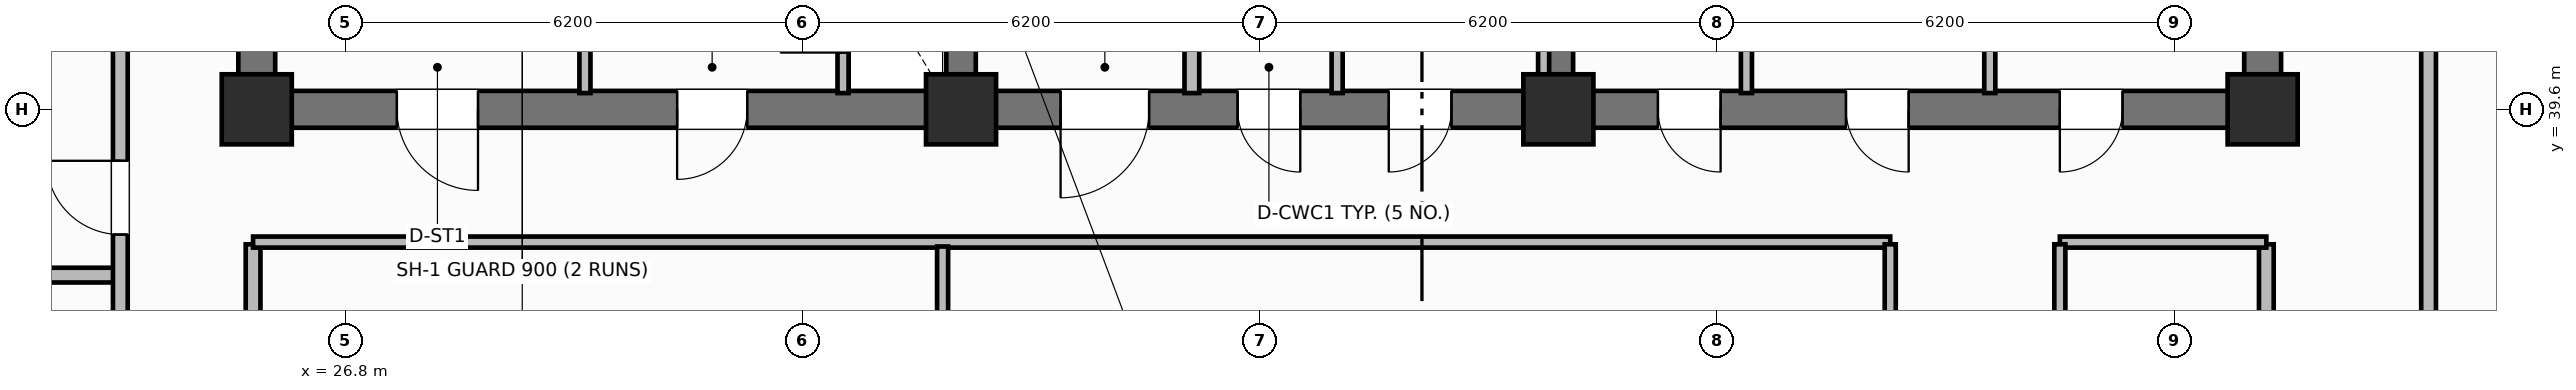
"""IFC4 building model, lengths in metres.
Left out: names, types, materials, properties, quantities, classifications, styles, units other than length and angle.
Written with IfcOpenShell. Run it as: python <this file> out.ifc"""

import sys

from ifc_helpers import new_model, si_unit, direction, frame, frame_2d, origin, origin_2d, place, context, subcontext, project, spatial, rectangle, extrude, element, fill, save


model = new_model("IFC4")
c1 = context("Model", 3, precision=1e-05, world=origin(), true_north=direction((0.0, 1.0)))
c2 = subcontext(c1, "Body", "Model", "MODEL_VIEW")
j1 = project(units=[si_unit("LENGTHUNIT", "METRE"), si_unit("PLANEANGLEUNIT", "RADIAN")], contexts=[c1])
p1 = place(None, origin())
s1 = spatial("IfcSite", under=j1, at=p1, CompositionType="ELEMENT")
p2 = place(p1, origin())
s2 = spatial("IfcBuilding", under=s1, at=p2, CompositionType="ELEMENT")
p3 = place(p2, frame((0.0, 0.0, 173.7)))
s3 = spatial("IfcBuildingStorey", under=s2, at=p3, CompositionType="ELEMENT", Elevation=173.7)
for number, where, z_axis, x_axis in (
    (1, (25.6, 39.85, 0.0), (0.0, 0.0, 1.0), (0.0, 1.0, 0.0)),
    (2, (52.8, 39.85, 0.0), (0.0, 0.0, 1.0), (0.0, 1.0, 0.0)),
):
    element("IfcWall", number, at=place(p3, frame(where, z_axis=z_axis, x_axis=x_axis)), inside=s3, PredefinedType="SHEAR", context=c2, shape_type="SweptSolid", body=[
        extrude(rectangle(XDim=5.7, YDim=0.5, at=frame_2d((2.85, 0.0))), origin(), (0.0, 0.0, 1.0), 3.7),
    ])
p4 = place(p3, frame((52.8, 39.6, 0.0), z_axis=(0.0, 0.0, 1.0), x_axis=(-1.0, 0.0, 0.0)))
e3 = element("IfcWall", 3, at=p4, inside=s3, PredefinedType="SHEAR", context=c2, shape_type="SweptSolid", body=[
    extrude(rectangle(XDim=27.2, YDim=0.5, at=frame_2d((13.6, 0.0))), origin(), (0.0, 0.0, 1.0), 3.7),
])
p5 = place(p4, frame((24.2, 0.0, 0.0)))
e4 = element("IfcOpeningElement", 4, at=p5, cuts=e3, PredefinedType="OPENING", context=c2, shape_type="SweptSolid", body=[
    extrude(rectangle(XDim=1.1, YDim=2.15, at=frame_2d((0.55, 1.075))), frame((0.0, 0.26, 0.0), z_axis=(0.0, -1.0, 0.0), x_axis=(1.0, 0.0, 0.0)), (0.0, 0.0, 1.0), 0.52),
])
p6 = place(p4, frame((20.55, 0.0, 0.0)))
e5 = element("IfcOpeningElement", 5, at=p6, cuts=e3, PredefinedType="OPENING", context=c2, shape_type="SweptSolid", body=[
    extrude(rectangle(XDim=0.95, YDim=2.1, at=frame_2d((0.475, 1.05))), frame((0.0, 0.26, 0.0), z_axis=(0.0, -1.0, 0.0), x_axis=(1.0, 0.0, 0.0)), (0.0, 0.0, 1.0), 0.52),
])
p7 = place(p4, frame((15.1, 0.0, 0.0)))
e6 = element("IfcOpeningElement", 6, at=p7, cuts=e3, PredefinedType="OPENING", context=c2, shape_type="SweptSolid", body=[
    extrude(rectangle(XDim=1.2, YDim=2.15, at=frame_2d((0.6, 1.075))), frame((0.0, 0.26, 0.0), z_axis=(0.0, -1.0, 0.0), x_axis=(1.0, 0.0, 0.0)), (0.0, 0.0, 1.0), 0.52),
])
p8 = place(p4, frame((13.05, 0.0, 0.0)))
e7 = element("IfcOpeningElement", 7, at=p8, cuts=e3, PredefinedType="OPENING", context=c2, shape_type="SweptSolid", body=[
    extrude(rectangle(XDim=0.85, YDim=2.1, at=frame_2d((0.425, 1.05))), frame((0.0, 0.26, 0.0), z_axis=(0.0, -1.0, 0.0), x_axis=(1.0, 0.0, 0.0)), (0.0, 0.0, 1.0), 0.52),
])
p9 = place(p4, frame((11.0, 0.0, 0.0)))
e8 = element("IfcOpeningElement", 8, at=p9, cuts=e3, PredefinedType="OPENING", context=c2, shape_type="SweptSolid", body=[
    extrude(rectangle(XDim=0.85, YDim=2.1, at=frame_2d((0.425, 1.05))), frame((0.0, 0.26, 0.0), z_axis=(0.0, -1.0, 0.0), x_axis=(1.0, 0.0, 0.0)), (0.0, 0.0, 1.0), 0.52),
])
p10 = place(p4, frame((7.35, 0.0, 0.0)))
e9 = element("IfcOpeningElement", 9, at=p10, cuts=e3, PredefinedType="OPENING", context=c2, shape_type="SweptSolid", body=[
    extrude(rectangle(XDim=0.85, YDim=2.1, at=frame_2d((0.425, 1.05))), frame((0.0, 0.26, 0.0), z_axis=(0.0, -1.0, 0.0), x_axis=(1.0, 0.0, 0.0)), (0.0, 0.0, 1.0), 0.52),
])
p11 = place(p4, frame((4.8, 0.0, 0.0)))
e10 = element("IfcOpeningElement", 10, at=p11, cuts=e3, PredefinedType="OPENING", context=c2, shape_type="SweptSolid", body=[
    extrude(rectangle(XDim=0.85, YDim=2.1, at=frame_2d((0.425, 1.05))), frame((0.0, 0.26, 0.0), z_axis=(0.0, -1.0, 0.0), x_axis=(1.0, 0.0, 0.0)), (0.0, 0.0, 1.0), 0.52),
])
p12 = place(p4, frame((1.9, 0.0, 0.0)))
e11 = element("IfcOpeningElement", 11, at=p12, cuts=e3, PredefinedType="OPENING", context=c2, shape_type="SweptSolid", body=[
    extrude(rectangle(XDim=0.85, YDim=2.1, at=frame_2d((0.425, 1.05))), frame((0.0, 0.26, 0.0), z_axis=(0.0, -1.0, 0.0), x_axis=(1.0, 0.0, 0.0)), (0.0, 0.0, 1.0), 0.52),
])
for number, where, z_axis, x_axis in (
    (12, (35.15, 39.85, 0.0), (0.0, 0.0, 1.0), (0.0, 1.0, 0.0)),
    (13, (43.25, 39.85, 0.0), (0.0, 0.0, 1.0), (0.0, 1.0, 0.0)),
):
    element("IfcWall", number, at=place(p3, frame(where, z_axis=z_axis, x_axis=x_axis)), inside=s3, PredefinedType="SHEAR", context=c2, shape_type="SweptSolid", body=[
        extrude(rectangle(XDim=5.7, YDim=0.4, at=frame_2d((2.85, 0.0))), origin(), (0.0, 0.0, 1.0), 3.7),
    ])
for number, where, z_axis, x_axis in (
    (14, (25.6, 39.6, 0.0), (0.0, 0.0, 1.0), (1.0, 0.0, 0.0)),
    (15, (35.15, 39.6, 0.0), (0.0, 0.0, 1.0), (1.0, 0.0, 0.0)),
    (16, (43.25, 39.6, 0.0), (0.0, 0.0, 1.0), (1.0, 0.0, 0.0)),
    (17, (52.8, 39.6, 0.0), (0.0, 0.0, 1.0), (1.0, 0.0, 0.0)),
):
    element("IfcColumn", number, at=place(p3, frame(where, z_axis=z_axis, x_axis=x_axis)), inside=s3, PredefinedType="COLUMN", context=c2, shape_type="SweptSolid", body=[
        extrude(rectangle(XDim=0.95, YDim=0.95, at=origin_2d()), origin(), (0.0, 0.0, 1.0), 3.7),
    ])
p13 = place(p3, frame((33.55, 39.82, 0.0), z_axis=(0.0, 0.0, 1.0), x_axis=(0.0, 1.0, 0.0)))
e18 = element("IfcWall", 18, at=p13, inside=s3, PredefinedType="PARTITIONING", context=c2, shape_type="SweptSolid", body=[
    extrude(rectangle(XDim=2.13, YDim=0.15, at=frame_2d((1.065, 0.0))), origin(), (0.0, 0.0, 1.0), 2.55),
])
p14 = place(p13, frame((0.55, 0.0, 0.0)))
e19 = element("IfcOpeningElement", 19, at=p14, cuts=e18, PredefinedType="OPENING", context=c2, shape_type="SweptSolid", body=[
    extrude(rectangle(XDim=0.85, YDim=2.05, at=frame_2d((0.425, 1.025))), frame((0.0, 0.085, 0.0), z_axis=(0.0, -1.0, 0.0), x_axis=(1.0, 0.0, 0.0)), (0.0, 0.0, 1.0), 0.17),
])
p15 = place(p3, frame((30.05, 39.82, 0.0), z_axis=(0.0, 0.0, 1.0), x_axis=(0.0, 1.0, 0.0)))
e20 = element("IfcWall", 20, at=p15, inside=s3, PredefinedType="PARTITIONING", context=c2, shape_type="SweptSolid", body=[
    extrude(rectangle(XDim=2.13, YDim=0.15, at=frame_2d((1.065, 0.0))), origin(), (0.0, 0.0, 1.0), 2.55),
])
p16 = place(p3, frame((38.28, 39.82, 0.0), z_axis=(0.0, 0.0, 1.0), x_axis=(0.0, 1.0, 0.0)))
e21 = element("IfcWall", 21, at=p16, inside=s3, PredefinedType="PARTITIONING", context=c2, shape_type="SweptSolid", body=[
    extrude(rectangle(XDim=5.63, YDim=0.2, at=frame_2d((2.815, 0.0))), origin(), (0.0, 0.0, 1.0), 2.55),
])
for number, where, z_axis, x_axis in (
    (22, (43.05, 39.82, 0.0), (0.0, 0.0, 1.0), (0.0, 1.0, 0.0)),
    (23, (40.25, 39.82, 0.0), (0.0, 0.0, 1.0), (0.0, 1.0, 0.0)),
    (24, (45.8, 39.82, 0.0), (0.0, 0.0, 1.0), (0.0, 1.0, 0.0)),
):
    element("IfcWall", number, at=place(p3, frame(where, z_axis=z_axis, x_axis=x_axis)), inside=s3, PredefinedType="PARTITIONING", context=c2, shape_type="SweptSolid", body=[
        extrude(rectangle(XDim=5.63, YDim=0.15, at=frame_2d((2.815, 0.0))), origin(), (0.0, 0.0, 1.0), 2.55),
    ])
p17 = place(p3, frame((49.1, 39.82, 0.0), z_axis=(0.0, 0.0, 1.0), x_axis=(0.0, 1.0, 0.0)))
e25 = element("IfcWall", 25, at=p17, inside=s3, PredefinedType="PARTITIONING", context=c2, shape_type="SweptSolid", body=[
    extrude(rectangle(XDim=2.73, YDim=0.15, at=frame_2d((1.365, 0.0))), origin(), (0.0, 0.0, 1.0), 2.55),
])
for number, where, z_axis, x_axis in (
    (26, (25.55, 18.63, 0.0), (0.0, 0.0, 1.0), (0.0, 1.0, 0.0)),
    (27, (52.85, 18.63, 0.0), (0.0, 0.0, 1.0), (0.0, 1.0, 0.0)),
):
    element("IfcWall", number, at=place(p3, frame(where, z_axis=z_axis, x_axis=x_axis)), inside=s3, PredefinedType="PARTITIONING", context=c2, shape_type="SweptSolid", body=[
        extrude(rectangle(XDim=19.14, YDim=0.2, at=frame_2d((9.57, 0.0))), origin(), (0.0, 0.0, 1.0), 2.55),
    ])
p18 = place(p3, frame((25.55, 37.8, 0.0), z_axis=(0.0, 0.0, 1.0), x_axis=(1.0, 0.0, 0.0)))
e28 = element("IfcWall", 28, at=p18, inside=s3, PredefinedType="PARTITIONING", context=c2, shape_type="SweptSolid", body=[
    extrude(rectangle(XDim=22.2, YDim=0.15, at=frame_2d((11.1, 0.0))), origin(), (0.0, 0.0, 1.0), 2.55),
])
p19 = place(p3, frame((50.05, 37.8, 0.0), z_axis=(0.0, 0.0, 1.0), x_axis=(1.0, 0.0, 0.0)))
e29 = element("IfcWall", 29, at=p19, inside=s3, PredefinedType="PARTITIONING", context=c2, shape_type="SweptSolid", body=[
    extrude(rectangle(XDim=2.8, YDim=0.15, at=frame_2d((1.4, 0.0))), origin(), (0.0, 0.0, 1.0), 2.55),
])
p20 = place(p3, frame((34.9, 18.66, 0.0), z_axis=(0.0, 0.0, 1.0), x_axis=(0.0, 1.0, 0.0)))
e30 = element("IfcWall", 30, at=p20, inside=s3, PredefinedType="PARTITIONING", context=c2, shape_type="SweptSolid", body=[
    extrude(rectangle(XDim=19.08, YDim=0.15, at=frame_2d((9.54, 0.0))), origin(), (0.0, 0.0, 1.0), 2.55),
])
p21 = place(p20, frame((5.0, 0.0, 0.0)))
e31 = element("IfcOpeningElement", 31, at=p21, cuts=e30, PredefinedType="OPENING", context=c2, shape_type="SweptSolid", body=[
    extrude(rectangle(XDim=1.0, YDim=2.15, at=frame_2d((0.5, 1.075))), frame((0.0, 0.085, 0.0), z_axis=(0.0, -1.0, 0.0), x_axis=(1.0, 0.0, 0.0)), (0.0, 0.0, 1.0), 0.17),
])
p22 = place(p3, frame((47.75, 18.63, 0.0), z_axis=(0.0, 0.0, 1.0), x_axis=(0.0, 1.0, 0.0)))
e32 = element("IfcWall", 32, at=p22, inside=s3, PredefinedType="PARTITIONING", context=c2, shape_type="SweptSolid", body=[
    extrude(rectangle(XDim=19.14, YDim=0.15, at=frame_2d((9.57, 0.0))), origin(), (0.0, 0.0, 1.0), 2.55),
])
p23 = place(p22, frame((2.4, 0.0, 0.0)))
e33 = element("IfcOpeningElement", 33, at=p23, cuts=e32, PredefinedType="OPENING", context=c2, shape_type="SweptSolid", body=[
    extrude(rectangle(XDim=0.9, YDim=2.1, at=frame_2d((0.45, 1.05))), frame((0.0, 0.085, 0.0), z_axis=(0.0, -1.0, 0.0), x_axis=(1.0, 0.0, 0.0)), (0.0, 0.0, 1.0), 0.17),
])
p24 = place(p22, frame((10.804, 0.0, 0.0)))
e34 = element("IfcOpeningElement", 34, at=p24, cuts=e32, PredefinedType="OPENING", context=c2, shape_type="SweptSolid", body=[
    extrude(rectangle(XDim=0.9, YDim=2.1, at=frame_2d((0.45, 1.05))), frame((0.0, 0.085, 0.0), z_axis=(0.0, -1.0, 0.0), x_axis=(1.0, 0.0, 0.0)), (0.0, 0.0, 1.0), 0.17),
])
p25 = place(p3, frame((50.05, 18.63, 0.0), z_axis=(0.0, 0.0, 1.0), x_axis=(0.0, 1.0, 0.0)))
e35 = element("IfcWall", 35, at=p25, inside=s3, PredefinedType="PARTITIONING", context=c2, shape_type="SweptSolid", body=[
    extrude(rectangle(XDim=19.14, YDim=0.15, at=frame_2d((9.57, 0.0))), origin(), (0.0, 0.0, 1.0), 2.55),
])
p26 = place(p25, frame((2.4, 0.0, 0.0)))
e36 = element("IfcOpeningElement", 36, at=p26, cuts=e35, PredefinedType="OPENING", context=c2, shape_type="SweptSolid", body=[
    extrude(rectangle(XDim=1.0, YDim=2.15, at=frame_2d((0.5, 1.075))), frame((0.0, 0.085, 0.0), z_axis=(0.0, -1.0, 0.0), x_axis=(1.0, 0.0, 0.0)), (0.0, 0.0, 1.0), 0.17),
])
p27 = place(p25, frame((10.804, 0.0, 0.0)))
e37 = element("IfcOpeningElement", 37, at=p27, cuts=e35, PredefinedType="OPENING", context=c2, shape_type="SweptSolid", body=[
    extrude(rectangle(XDim=1.0, YDim=2.15, at=frame_2d((0.5, 1.075))), frame((0.0, 0.085, 0.0), z_axis=(0.0, -1.0, 0.0), x_axis=(1.0, 0.0, 0.0)), (0.0, 0.0, 1.0), 0.17),
])
p28 = place(p3, frame((16.57, 37.352, 0.0), z_axis=(0.0, 0.0, 1.0), x_axis=(1.0, 0.0, 0.0)))
e38 = element("IfcWall", 38, at=p28, inside=s3, PredefinedType="PARTITIONING", context=c2, shape_type="SweptSolid", body=[
    extrude(rectangle(XDim=7.18, YDim=0.2, at=frame_2d((3.59, 0.0))), origin(), (0.0, 0.0, 1.0), 2.55),
])
p29 = place(p3, frame((23.75, 10.6, 0.0), z_axis=(0.0, 0.0, 1.0), x_axis=(0.0, 1.0, 0.0)))
e39 = element("IfcWall", 39, at=p29, inside=s3, PredefinedType="PARTITIONING", context=c2, shape_type="SweptSolid", body=[
    extrude(rectangle(XDim=35.2, YDim=0.2, at=frame_2d((17.6, 0.0))), origin(), (0.0, 0.0, 1.0), 2.55),
])
p30 = place(p29, frame((2.65, 0.0, 0.0)))
e40 = element("IfcOpeningElement", 40, at=p30, cuts=e39, PredefinedType="OPENING", context=c2, shape_type="SweptSolid", body=[
    extrude(rectangle(XDim=1.0, YDim=2.15, at=frame_2d((0.5, 1.075))), frame((0.0, 0.11, 0.0), z_axis=(0.0, -1.0, 0.0), x_axis=(1.0, 0.0, 0.0)), (0.0, 0.0, 1.0), 0.22),
])
p31 = place(p29, frame((11.4, 0.0, 0.0)))
e41 = element("IfcOpeningElement", 41, at=p31, cuts=e39, PredefinedType="OPENING", context=c2, shape_type="SweptSolid", body=[
    extrude(rectangle(XDim=1.0, YDim=2.15, at=frame_2d((0.5, 1.075))), frame((0.0, 0.11, 0.0), z_axis=(0.0, -1.0, 0.0), x_axis=(1.0, 0.0, 0.0)), (0.0, 0.0, 1.0), 0.22),
])
p32 = place(p29, frame((21.37, 0.0, 0.0)))
e42 = element("IfcOpeningElement", 42, at=p32, cuts=e39, PredefinedType="OPENING", context=c2, shape_type="SweptSolid", body=[
    extrude(rectangle(XDim=1.0, YDim=2.15, at=frame_2d((0.5, 1.075))), frame((0.0, 0.11, 0.0), z_axis=(0.0, -1.0, 0.0), x_axis=(1.0, 0.0, 0.0)), (0.0, 0.0, 1.0), 0.22),
])
p33 = place(p29, frame((27.302, 0.0, 0.0)))
e43 = element("IfcOpeningElement", 43, at=p33, cuts=e39, PredefinedType="OPENING", context=c2, shape_type="SweptSolid", body=[
    extrude(rectangle(XDim=1.0, YDim=2.15, at=frame_2d((0.5, 1.075))), frame((0.0, 0.11, 0.0), z_axis=(0.0, -1.0, 0.0), x_axis=(1.0, 0.0, 0.0)), (0.0, 0.0, 1.0), 0.22),
])
p34 = place(p3, frame((55.05, 10.6, 0.0), z_axis=(0.0, 0.0, 1.0), x_axis=(0.0, 1.0, 0.0)))
e44 = element("IfcWall", 44, at=p34, inside=s3, PredefinedType="PARTITIONING", context=c2, shape_type="SweptSolid", body=[
    extrude(rectangle(XDim=35.2, YDim=0.2, at=frame_2d((17.6, 0.0))), origin(), (0.0, 0.0, 1.0), 2.55),
])
p35 = place(p34, frame((2.65, 0.0, 0.0)))
e45 = element("IfcOpeningElement", 45, at=p35, cuts=e44, PredefinedType="OPENING", context=c2, shape_type="SweptSolid", body=[
    extrude(rectangle(XDim=1.0, YDim=2.15, at=frame_2d((0.5, 1.075))), frame((0.0, 0.11, 0.0), z_axis=(0.0, -1.0, 0.0), x_axis=(1.0, 0.0, 0.0)), (0.0, 0.0, 1.0), 0.22),
])
p36 = place(p34, frame((19.95, 0.0, 0.0)))
e46 = element("IfcOpeningElement", 46, at=p36, cuts=e44, PredefinedType="OPENING", context=c2, shape_type="SweptSolid", body=[
    extrude(rectangle(XDim=1.0, YDim=2.15, at=frame_2d((0.5, 1.075))), frame((0.0, 0.11, 0.0), z_axis=(0.0, -1.0, 0.0), x_axis=(1.0, 0.0, 0.0)), (0.0, 0.0, 1.0), 0.22),
])
p37 = place(p14, origin())
e47 = element("IfcDoor", 47, at=p37, inside=s3, OperationType="SINGLE_SWING_LEFT", PredefinedType="TRAPDOOR", context=c2, shape_type="SweptSolid", body=[
    extrude(rectangle(XDim=0.85, YDim=2.05, at=frame_2d((0.425, 1.025))), frame((0.0, 0.025, 0.0), z_axis=(0.0, -1.0, 0.0), x_axis=(1.0, 0.0, 0.0)), (0.0, 0.0, 1.0), 0.05),
])
fill(e19, e47)
p38 = place(p33, origin())
e48 = element("IfcDoor", 48, at=p38, inside=s3, OperationType="SINGLE_SWING_RIGHT", PredefinedType="DOOR", context=c2, shape_type="SweptSolid", body=[
    extrude(rectangle(XDim=1.0, YDim=2.15, at=frame_2d((0.5, 1.075))), frame((0.0, 0.025, 0.0), z_axis=(0.0, -1.0, 0.0), x_axis=(1.0, 0.0, 0.0)), (0.0, 0.0, 1.0), 0.05),
])
fill(e43, e48)
p39 = place(p5, origin())
e49 = element("IfcDoor", 49, at=p39, inside=s3, OperationType="SINGLE_SWING_LEFT", PredefinedType="DOOR", context=c2, shape_type="SweptSolid", body=[
    extrude(rectangle(XDim=1.1, YDim=2.15, at=frame_2d((0.55, 1.075))), frame((0.0, 0.025, 0.0), z_axis=(0.0, -1.0, 0.0), x_axis=(1.0, 0.0, 0.0)), (0.0, 0.0, 1.0), 0.05),
])
fill(e4, e49)
p40 = place(p6, origin())
e50 = element("IfcDoor", 50, at=p40, inside=s3, OperationType="SINGLE_SWING_RIGHT", PredefinedType="DOOR", context=c2, shape_type="SweptSolid", body=[
    extrude(rectangle(XDim=0.95, YDim=2.1, at=frame_2d((0.475, 1.05))), frame((0.0, 0.025, 0.0), z_axis=(0.0, -1.0, 0.0), x_axis=(1.0, 0.0, 0.0)), (0.0, 0.0, 1.0), 0.05),
])
fill(e5, e50)
p41 = place(p7, origin())
e51 = element("IfcDoor", 51, at=p41, inside=s3, OperationType="SINGLE_SWING_RIGHT", PredefinedType="DOOR", context=c2, shape_type="SweptSolid", body=[
    extrude(rectangle(XDim=1.2, YDim=2.15, at=frame_2d((0.6, 1.075))), frame((0.0, 0.025, 0.0), z_axis=(0.0, -1.0, 0.0), x_axis=(1.0, 0.0, 0.0)), (0.0, 0.0, 1.0), 0.05),
])
fill(e6, e51)
p42 = place(p8, origin())
e52 = element("IfcDoor", 52, at=p42, inside=s3, OperationType="SINGLE_SWING_LEFT", PredefinedType="DOOR", context=c2, shape_type="SweptSolid", body=[
    extrude(rectangle(XDim=0.85, YDim=2.1, at=frame_2d((0.425, 1.05))), frame((0.0, 0.025, 0.0), z_axis=(0.0, -1.0, 0.0), x_axis=(1.0, 0.0, 0.0)), (0.0, 0.0, 1.0), 0.05),
])
fill(e7, e52)
p43 = place(p9, origin())
e53 = element("IfcDoor", 53, at=p43, inside=s3, OperationType="SINGLE_SWING_RIGHT", PredefinedType="DOOR", context=c2, shape_type="SweptSolid", body=[
    extrude(rectangle(XDim=0.85, YDim=2.1, at=frame_2d((0.425, 1.05))), frame((0.0, 0.025, 0.0), z_axis=(0.0, -1.0, 0.0), x_axis=(1.0, 0.0, 0.0)), (0.0, 0.0, 1.0), 0.05),
])
fill(e8, e53)
p44 = place(p10, origin())
e54 = element("IfcDoor", 54, at=p44, inside=s3, OperationType="SINGLE_SWING_LEFT", PredefinedType="DOOR", context=c2, shape_type="SweptSolid", body=[
    extrude(rectangle(XDim=0.85, YDim=2.1, at=frame_2d((0.425, 1.05))), frame((0.0, 0.025, 0.0), z_axis=(0.0, -1.0, 0.0), x_axis=(1.0, 0.0, 0.0)), (0.0, 0.0, 1.0), 0.05),
])
fill(e9, e54)
p45 = place(p11, origin())
e55 = element("IfcDoor", 55, at=p45, inside=s3, OperationType="SINGLE_SWING_LEFT", PredefinedType="DOOR", context=c2, shape_type="SweptSolid", body=[
    extrude(rectangle(XDim=0.85, YDim=2.1, at=frame_2d((0.425, 1.05))), frame((0.0, 0.025, 0.0), z_axis=(0.0, -1.0, 0.0), x_axis=(1.0, 0.0, 0.0)), (0.0, 0.0, 1.0), 0.05),
])
fill(e10, e55)
p46 = place(p12, origin())
e56 = element("IfcDoor", 56, at=p46, inside=s3, OperationType="SINGLE_SWING_RIGHT", PredefinedType="DOOR", context=c2, shape_type="SweptSolid", body=[
    extrude(rectangle(XDim=0.85, YDim=2.1, at=frame_2d((0.425, 1.05))), frame((0.0, 0.025, 0.0), z_axis=(0.0, -1.0, 0.0), x_axis=(1.0, 0.0, 0.0)), (0.0, 0.0, 1.0), 0.05),
])
fill(e11, e56)
save(model, sys.argv[1])
